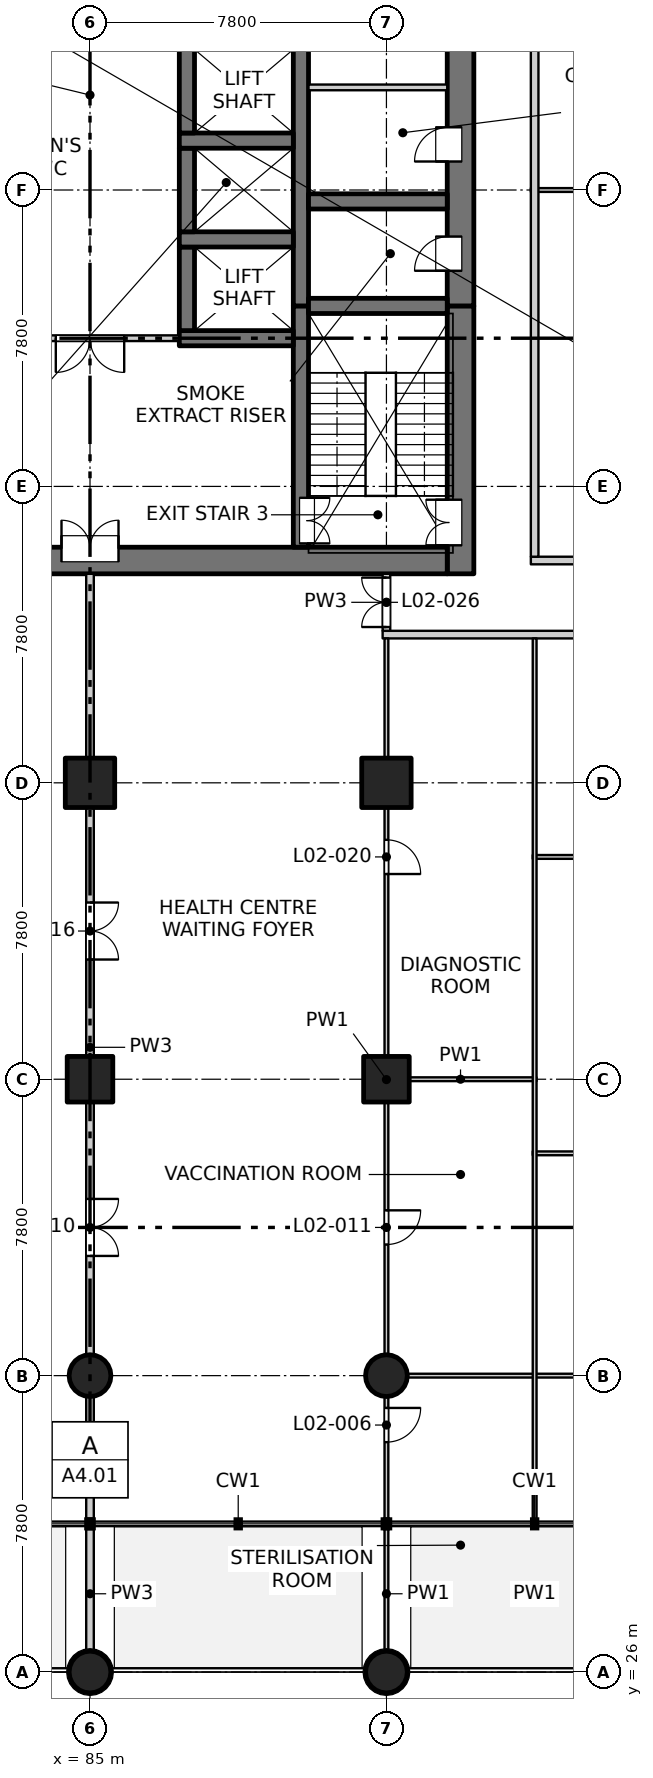
"""IFC4 building model, lengths in metres.
Left out: names, types, materials, properties, quantities, classifications, styles, units other than length and angle.
Written with IfcOpenShell. Run it as: python <this file> out.ifc"""

import sys

from ifc_helpers import new_model, si_unit, direction, frame, frame_2d, origin, origin_2d, place, context, subcontext, project, spatial, rectangle, circle, extrude, element, fill, save


model = new_model("IFC4")
c1 = context("Model", 3, precision=1e-05, world=origin(), true_north=direction((0.0, 1.0)))
c2 = subcontext(c1, "Body", "Model", "MODEL_VIEW")
j1 = project(units=[si_unit("LENGTHUNIT", "METRE"), si_unit("PLANEANGLEUNIT", "RADIAN")], contexts=[c1])
p1 = place(None, origin())
s1 = spatial("IfcSite", under=j1, at=p1, CompositionType="ELEMENT")
p2 = place(p1, origin())
s2 = spatial("IfcBuilding", under=s1, at=p2, CompositionType="ELEMENT")
p3 = place(p2, frame((0.0, 0.0, 10.5)))
s3 = spatial("IfcBuildingStorey", under=s2, at=p3, CompositionType="ELEMENT", Elevation=10.5)
for number, where, z_axis, x_axis in (
    (1, (85.0, 41.6, -0.3), (0.0, 0.0, 1.0), (1.0, 0.0, 0.0)),
    (2, (92.8, 41.6, -0.3), (0.0, 0.0, 1.0), (1.0, 0.0, 0.0)),
):
    element("IfcColumn", number, at=place(p3, frame(where, z_axis=z_axis, x_axis=x_axis)), inside=s3, PredefinedType="COLUMN", context=c2, shape_type="SweptSolid", body=[
        extrude(rectangle(XDim=1.2, YDim=1.2, at=origin_2d()), origin(), (0.0, 0.0, 1.0), 4.45),
    ])
for number, where, z_axis, x_axis in (
    (3, (85.0, 49.4, -0.3), (0.0, 0.0, 1.0), (1.0, 0.0, 0.0)),
    (4, (92.8, 49.4, -0.3), (0.0, 0.0, 1.0), (1.0, 0.0, 0.0)),
):
    element("IfcColumn", number, at=place(p3, frame(where, z_axis=z_axis, x_axis=x_axis)), inside=s3, PredefinedType="COLUMN", context=c2, shape_type="SweptSolid", body=[
        extrude(rectangle(XDim=1.3, YDim=1.3, at=origin_2d()), origin(), (0.0, 0.0, 1.0), 4.45),
    ])
for number, where, z_axis, x_axis in (
    (5, (85.0, 26.0, -0.3), (0.0, 0.0, 1.0), (1.0, 0.0, 0.0)),
    (6, (85.0, 33.8, -0.3), (0.0, 0.0, 1.0), (1.0, 0.0, 0.0)),
    (7, (92.8, 26.0, -0.3), (0.0, 0.0, 1.0), (1.0, 0.0, 0.0)),
    (8, (92.8, 33.8, -0.3), (0.0, 0.0, 1.0), (1.0, 0.0, 0.0)),
):
    element("IfcColumn", number, at=place(p3, frame(where, z_axis=z_axis, x_axis=x_axis)), inside=s3, PredefinedType="COLUMN", context=c2, shape_type="SweptSolid", body=[
        extrude(circle(Radius=0.55, at=origin_2d()), origin(), (0.0, 0.0, 1.0), 4.45),
    ])
p4 = place(p3, frame((94.75, 54.9, -0.3), z_axis=(0.0, 0.0, 1.0), x_axis=(0.0, 1.0, 0.0)))
e9 = element("IfcWall", 9, at=p4, inside=s3, PredefinedType="SOLIDWALL", context=c2, shape_type="SweptSolid", body=[
    extrude(rectangle(XDim=7.05, YDim=0.7, at=frame_2d((3.525, 0.0))), origin(), (0.0, 0.0, 1.0), 4.45),
])
p5 = place(p4, frame((0.75, 0.0, 0.3)))
e10 = element("IfcOpeningElement", 10, at=p5, cuts=e9, PredefinedType="OPENING", context=c2, shape_type="SweptSolid", body=[
    extrude(rectangle(XDim=1.2, YDim=2.1, at=frame_2d((0.6, 1.05))), frame((0.0, 0.36, 0.0), z_axis=(0.0, -1.0, 0.0), x_axis=(1.0, 0.0, 0.0)), (0.0, 0.0, 1.0), 0.72),
])
p6 = place(p3, frame((94.75, 61.95, -0.3), z_axis=(0.0, 0.0, 1.0), x_axis=(0.0, 1.0, 0.0)))
e11 = element("IfcWall", 11, at=p6, inside=s3, PredefinedType="SOLIDWALL", context=c2, shape_type="SweptSolid", body=[
    extrude(rectangle(XDim=15.35, YDim=0.7, at=frame_2d((7.675, 0.0))), origin(), (0.0, 0.0, 1.0), 4.45),
])
p7 = place(p6, frame((0.925, 0.0, 0.3)))
e12 = element("IfcOpeningElement", 12, at=p7, cuts=e11, PredefinedType="OPENING", context=c2, shape_type="SweptSolid", body=[
    extrude(rectangle(XDim=0.9, YDim=2.1, at=frame_2d((0.45, 1.05))), frame((0.0, 0.36, 0.0), z_axis=(0.0, -1.0, 0.0), x_axis=(1.0, 0.0, 0.0)), (0.0, 0.0, 1.0), 0.72),
])
p8 = place(p6, frame((3.8, 0.0, 0.3)))
e13 = element("IfcOpeningElement", 13, at=p8, cuts=e11, PredefinedType="OPENING", context=c2, shape_type="SweptSolid", body=[
    extrude(rectangle(XDim=0.9, YDim=2.1, at=frame_2d((0.45, 1.05))), frame((0.0, 0.36, 0.0), z_axis=(0.0, -1.0, 0.0), x_axis=(1.0, 0.0, 0.0)), (0.0, 0.0, 1.0), 0.72),
])
p9 = place(p6, frame((6.8, 0.0, 0.3)))
e14 = element("IfcOpeningElement", 14, at=p9, cuts=e11, PredefinedType="OPENING", context=c2, shape_type="SweptSolid", body=[
    extrude(rectangle(XDim=0.9, YDim=2.1, at=frame_2d((0.45, 1.05))), frame((0.0, 0.36, 0.0), z_axis=(0.0, -1.0, 0.0), x_axis=(1.0, 0.0, 0.0)), (0.0, 0.0, 1.0), 0.72),
])
p10 = place(p6, frame((9.8, 0.0, 0.3)))
e15 = element("IfcOpeningElement", 15, at=p10, cuts=e11, PredefinedType="OPENING", context=c2, shape_type="SweptSolid", body=[
    extrude(rectangle(XDim=0.9, YDim=2.1, at=frame_2d((0.45, 1.05))), frame((0.0, 0.36, 0.0), z_axis=(0.0, -1.0, 0.0), x_axis=(1.0, 0.0, 0.0)), (0.0, 0.0, 1.0), 0.72),
])
p11 = place(p6, frame((13.1, 0.0, 0.3)))
e16 = element("IfcOpeningElement", 16, at=p11, cuts=e11, PredefinedType="OPENING", context=c2, shape_type="SweptSolid", body=[
    extrude(rectangle(XDim=0.9, YDim=2.1, at=frame_2d((0.45, 1.05))), frame((0.0, 0.36, 0.0), z_axis=(0.0, -1.0, 0.0), x_axis=(1.0, 0.0, 0.0)), (0.0, 0.0, 1.0), 0.72),
])
p12 = place(p3, frame((75.6, 55.25, -0.3), z_axis=(0.0, 0.0, 1.0), x_axis=(1.0, 0.0, 0.0)))
e17 = element("IfcWall", 17, at=p12, inside=s3, PredefinedType="SOLIDWALL", context=c2, shape_type="SweptSolid", body=[
    extrude(rectangle(XDim=18.8, YDim=0.7, at=frame_2d((9.4, 0.0))), origin(), (0.0, 0.0, 1.0), 4.45),
])
p13 = place(p12, frame((8.65, 0.0, 0.3)))
e18 = element("IfcOpeningElement", 18, at=p13, cuts=e17, PredefinedType="OPENING", context=c2, shape_type="SweptSolid", body=[
    extrude(rectangle(XDim=1.5, YDim=2.1, at=frame_2d((0.75, 1.05))), frame((0.0, 0.36, 0.0), z_axis=(0.0, -1.0, 0.0), x_axis=(1.0, 0.0, 0.0)), (0.0, 0.0, 1.0), 0.72),
])
p14 = place(p3, frame((90.55, 55.6, -0.3), z_axis=(0.0, 0.0, 1.0), x_axis=(0.0, 1.0, 0.0)))
e19 = element("IfcWall", 19, at=p14, inside=s3, PredefinedType="SOLIDWALL", context=c2, shape_type="SweptSolid", body=[
    extrude(rectangle(XDim=6.35, YDim=0.4, at=frame_2d((3.175, 0.0))), origin(), (0.0, 0.0, 1.0), 4.45),
])
p15 = place(p14, frame((0.1, 0.0, 0.3)))
e20 = element("IfcOpeningElement", 20, at=p15, cuts=e19, PredefinedType="OPENING", context=c2, shape_type="SweptSolid", body=[
    extrude(rectangle(XDim=1.2, YDim=2.1, at=frame_2d((0.6, 1.05))), frame((0.0, 0.21, 0.0), z_axis=(0.0, -1.0, 0.0), x_axis=(1.0, 0.0, 0.0)), (0.0, 0.0, 1.0), 0.42),
])
p16 = place(p3, frame((90.55, 61.95, -0.3), z_axis=(0.0, 0.0, 1.0), x_axis=(0.0, 1.0, 0.0)))
e21 = element("IfcWall", 21, at=p16, inside=s3, PredefinedType="SOLIDWALL", context=c2, shape_type="SweptSolid", body=[
    extrude(rectangle(XDim=15.35, YDim=0.4, at=frame_2d((7.675, 0.0))), origin(), (0.0, 0.0, 1.0), 4.45),
])
p17 = place(p3, frame((87.35, 61.1, -0.3), z_axis=(0.0, 0.0, 1.0), x_axis=(1.0, 0.0, 0.0)))
e22 = element("IfcWall", 22, at=p17, inside=s3, PredefinedType="SOLIDWALL", context=c2, shape_type="SweptSolid", body=[
    extrude(rectangle(XDim=3.0, YDim=0.4, at=frame_2d((1.5, 0.0))), origin(), (0.0, 0.0, 1.0), 4.45),
])
p18 = place(p3, frame((87.55, 61.3, -0.3), z_axis=(0.0, 0.0, 1.0), x_axis=(0.0, 1.0, 0.0)))
e23 = element("IfcWall", 23, at=p18, inside=s3, PredefinedType="SOLIDWALL", context=c2, shape_type="SweptSolid", body=[
    extrude(rectangle(XDim=2.2, YDim=0.4, at=frame_2d((1.1, 0.0))), origin(), (0.0, 0.0, 1.0), 4.45),
])
p19 = place(p3, frame((87.35, 63.7, -0.3), z_axis=(0.0, 0.0, 1.0), x_axis=(1.0, 0.0, 0.0)))
e24 = element("IfcWall", 24, at=p19, inside=s3, PredefinedType="SOLIDWALL", context=c2, shape_type="SweptSolid", body=[
    extrude(rectangle(XDim=3.0, YDim=0.4, at=frame_2d((1.5, 0.0))), origin(), (0.0, 0.0, 1.0), 4.45),
])
p20 = place(p3, frame((87.55, 63.9, -0.3), z_axis=(0.0, 0.0, 1.0), x_axis=(0.0, 1.0, 0.0)))
e25 = element("IfcWall", 25, at=p20, inside=s3, PredefinedType="SOLIDWALL", context=c2, shape_type="SweptSolid", body=[
    extrude(rectangle(XDim=2.2, YDim=0.4, at=frame_2d((1.1, 0.0))), origin(), (0.0, 0.0, 1.0), 4.45),
])
p21 = place(p3, frame((87.35, 66.3, -0.3), z_axis=(0.0, 0.0, 1.0), x_axis=(1.0, 0.0, 0.0)))
e26 = element("IfcWall", 26, at=p21, inside=s3, PredefinedType="SOLIDWALL", context=c2, shape_type="SweptSolid", body=[
    extrude(rectangle(XDim=3.0, YDim=0.4, at=frame_2d((1.5, 0.0))), origin(), (0.0, 0.0, 1.0), 4.45),
])
p22 = place(p3, frame((87.55, 66.5, -0.3), z_axis=(0.0, 0.0, 1.0), x_axis=(0.0, 1.0, 0.0)))
e27 = element("IfcWall", 27, at=p22, inside=s3, PredefinedType="SOLIDWALL", context=c2, shape_type="SweptSolid", body=[
    extrude(rectangle(XDim=2.2, YDim=0.4, at=frame_2d((1.1, 0.0))), origin(), (0.0, 0.0, 1.0), 4.45),
])
for number, where, z_axis, x_axis in (
    (28, (90.75, 61.95, -0.3), (0.0, 0.0, 1.0), (1.0, 0.0, 0.0)),
    (29, (90.75, 64.7, -0.3), (0.0, 0.0, 1.0), (1.0, 0.0, 0.0)),
):
    element("IfcWall", number, at=place(p3, frame(where, z_axis=z_axis, x_axis=x_axis)), inside=s3, PredefinedType="SOLIDWALL", context=c2, shape_type="SweptSolid", body=[
        extrude(rectangle(XDim=3.65, YDim=0.4, at=frame_2d((1.825, 0.0))), origin(), (0.0, 0.0, 1.0), 4.45),
    ])
p23 = place(p3, frame((92.75, 33.8, 0.0), z_axis=(0.0, 0.0, 1.0), x_axis=(1.0, 0.0, 0.0)))
e30 = element("IfcWall", 30, at=p23, inside=s3, PredefinedType="PARTITIONING", context=c2, shape_type="SweptSolid", body=[
    extrude(rectangle(XDim=17.7, YDim=0.1, at=frame_2d((8.85, 0.0))), origin(), (0.0, 0.0, 1.0), 4.15),
])
p24 = place(p3, frame((96.65, 39.65, 0.0), z_axis=(0.0, 0.0, 1.0), x_axis=(1.0, 0.0, 0.0)))
e31 = element("IfcWall", 31, at=p24, inside=s3, PredefinedType="PARTITIONING", context=c2, shape_type="SweptSolid", body=[
    extrude(rectangle(XDim=13.8, YDim=0.1, at=frame_2d((6.9, 0.0))), origin(), (0.0, 0.0, 1.0), 4.15),
])
p25 = place(p3, frame((92.75, 41.6, 0.0), z_axis=(0.0, 0.0, 1.0), x_axis=(1.0, 0.0, 0.0)))
e32 = element("IfcWall", 32, at=p25, inside=s3, PredefinedType="PARTITIONING", context=c2, shape_type="SweptSolid", body=[
    extrude(rectangle(XDim=4.0, YDim=0.1, at=frame_2d((2.0, 0.0))), origin(), (0.0, 0.0, 1.0), 3.7),
])
p26 = place(p3, frame((96.65, 47.45, 0.0), z_axis=(0.0, 0.0, 1.0), x_axis=(1.0, 0.0, 0.0)))
e33 = element("IfcWall", 33, at=p26, inside=s3, PredefinedType="PARTITIONING", context=c2, shape_type="SweptSolid", body=[
    extrude(rectangle(XDim=13.8, YDim=0.1, at=frame_2d((6.9, 0.0))), origin(), (0.0, 0.0, 1.0), 4.15),
])
p27 = place(p3, frame((92.7, 53.3, 0.0), z_axis=(0.0, 0.0, 1.0), x_axis=(1.0, 0.0, 0.0)))
e34 = element("IfcWall", 34, at=p27, inside=s3, PredefinedType="PARTITIONING", context=c2, shape_type="SweptSolid", body=[
    extrude(rectangle(XDim=17.75, YDim=0.2, at=frame_2d((8.875, 0.0))), origin(), (0.0, 0.0, 1.0), 4.15),
])
p28 = place(p3, frame((96.6, 55.25, 0.0), z_axis=(0.0, 0.0, 1.0), x_axis=(1.0, 0.0, 0.0)))
e35 = element("IfcWall", 35, at=p28, inside=s3, PredefinedType="PARTITIONING", context=c2, shape_type="SweptSolid", body=[
    extrude(rectangle(XDim=13.85, YDim=0.2, at=frame_2d((6.925, 0.0))), origin(), (0.0, 0.0, 1.0), 4.15),
])
p29 = place(p3, frame((82.65, 61.1, 0.0), z_axis=(0.0, 0.0, 1.0), x_axis=(1.0, 0.0, 0.0)))
e36 = element("IfcWall", 36, at=p29, inside=s3, PredefinedType="PARTITIONING", context=c2, shape_type="SweptSolid", body=[
    extrude(rectangle(XDim=4.7, YDim=0.15, at=frame_2d((2.35, 0.0))), origin(), (0.0, 0.0, 1.0), 4.15),
])
p30 = place(p29, frame((1.45, 0.0, 0.0)))
e37 = element("IfcOpeningElement", 37, at=p30, cuts=e36, PredefinedType="OPENING", context=c2, shape_type="SweptSolid", body=[
    extrude(rectangle(XDim=1.8, YDim=2.1, at=frame_2d((0.9, 1.05))), frame((0.0, 0.085, 0.0), z_axis=(0.0, -1.0, 0.0), x_axis=(1.0, 0.0, 0.0)), (0.0, 0.0, 1.0), 0.17),
])
p31 = place(p3, frame((96.6, 65.0, 0.0), z_axis=(0.0, 0.0, 1.0), x_axis=(1.0, 0.0, 0.0)))
e38 = element("IfcWall", 38, at=p31, inside=s3, PredefinedType="PARTITIONING", context=c2, shape_type="SweptSolid", body=[
    extrude(rectangle(XDim=13.85, YDim=0.1, at=frame_2d((6.925, 0.0))), origin(), (0.0, 0.0, 1.0), 4.15),
])
p32 = place(p3, frame((90.75, 67.7, 0.0), z_axis=(0.0, 0.0, 1.0), x_axis=(1.0, 0.0, 0.0)))
e39 = element("IfcWall", 39, at=p32, inside=s3, PredefinedType="PARTITIONING", context=c2, shape_type="SweptSolid", body=[
    extrude(rectangle(XDim=3.65, YDim=0.15, at=frame_2d((1.825, 0.0))), origin(), (0.0, 0.0, 1.0), 4.15),
])
p33 = place(p3, frame((85.0, 26.3, 0.0), z_axis=(0.0, 0.0, 1.0), x_axis=(0.0, 1.0, 0.0)))
e40 = element("IfcWall", 40, at=p33, inside=s3, PredefinedType="PARTITIONING", context=c2, shape_type="SweptSolid", body=[
    extrude(rectangle(XDim=3.52, YDim=0.2, at=frame_2d((1.76, 0.0))), origin(), (0.0, 0.0, 1.0), 4.15),
])
p34 = place(p3, frame((85.0, 29.98, 0.0), z_axis=(0.0, 0.0, 1.0), x_axis=(0.0, 1.0, 0.0)))
e41 = element("IfcWall", 41, at=p34, inside=s3, PredefinedType="PARTITIONING", context=c2, shape_type="SweptSolid", body=[
    extrude(rectangle(XDim=24.92, YDim=0.2, at=frame_2d((12.46, 0.0))), origin(), (0.0, 0.0, 1.0), 4.15),
])
p35 = place(p34, frame((6.97, 0.0, 0.0)))
e42 = element("IfcOpeningElement", 42, at=p35, cuts=e41, PredefinedType="OPENING", context=c2, shape_type="SweptSolid", body=[
    extrude(rectangle(XDim=1.5, YDim=2.1, at=frame_2d((0.75, 1.05))), frame((0.0, 0.11, 0.0), z_axis=(0.0, -1.0, 0.0), x_axis=(1.0, 0.0, 0.0)), (0.0, 0.0, 1.0), 0.22),
])
p36 = place(p34, frame((14.77, 0.0, 0.0)))
e43 = element("IfcOpeningElement", 43, at=p36, cuts=e41, PredefinedType="OPENING", context=c2, shape_type="SweptSolid", body=[
    extrude(rectangle(XDim=1.5, YDim=2.1, at=frame_2d((0.75, 1.05))), frame((0.0, 0.11, 0.0), z_axis=(0.0, -1.0, 0.0), x_axis=(1.0, 0.0, 0.0)), (0.0, 0.0, 1.0), 0.22),
])
p37 = place(p3, frame((92.8, 26.3, 0.0), z_axis=(0.0, 0.0, 1.0), x_axis=(0.0, 1.0, 0.0)))
e44 = element("IfcWall", 44, at=p37, inside=s3, PredefinedType="PARTITIONING", context=c2, shape_type="SweptSolid", body=[
    extrude(rectangle(XDim=3.52, YDim=0.1, at=frame_2d((1.76, 0.0))), origin(), (0.0, 0.0, 1.0), 4.15),
])
p38 = place(p3, frame((92.8, 29.98, 0.0), z_axis=(0.0, 0.0, 1.0), x_axis=(0.0, 1.0, 0.0)))
e45 = element("IfcWall", 45, at=p38, inside=s3, PredefinedType="PARTITIONING", context=c2, shape_type="SweptSolid", body=[
    extrude(rectangle(XDim=23.22, YDim=0.1, at=frame_2d((11.61, 0.0))), origin(), (0.0, 0.0, 1.0), 4.15),
])
p39 = place(p38, frame((2.07, 0.0, 0.0)))
e46 = element("IfcOpeningElement", 46, at=p39, cuts=e45, PredefinedType="OPENING", context=c2, shape_type="SweptSolid", body=[
    extrude(rectangle(XDim=0.9, YDim=2.1, at=frame_2d((0.45, 1.05))), frame((0.0, 0.06, 0.0), z_axis=(0.0, -1.0, 0.0), x_axis=(1.0, 0.0, 0.0)), (0.0, 0.0, 1.0), 0.12),
])
p40 = place(p38, frame((7.27, 0.0, 0.0)))
e47 = element("IfcOpeningElement", 47, at=p40, cuts=e45, PredefinedType="OPENING", context=c2, shape_type="SweptSolid", body=[
    extrude(rectangle(XDim=0.9, YDim=2.1, at=frame_2d((0.45, 1.05))), frame((0.0, 0.06, 0.0), z_axis=(0.0, -1.0, 0.0), x_axis=(1.0, 0.0, 0.0)), (0.0, 0.0, 1.0), 0.12),
])
p41 = place(p38, frame((17.02, 0.0, 0.0)))
e48 = element("IfcOpeningElement", 48, at=p41, cuts=e45, PredefinedType="OPENING", context=c2, shape_type="SweptSolid", body=[
    extrude(rectangle(XDim=0.9, YDim=2.1, at=frame_2d((0.45, 1.05))), frame((0.0, 0.06, 0.0), z_axis=(0.0, -1.0, 0.0), x_axis=(1.0, 0.0, 0.0)), (0.0, 0.0, 1.0), 0.12),
])
p42 = place(p3, frame((92.8, 53.4, 0.0), z_axis=(0.0, 0.0, 1.0), x_axis=(0.0, 1.0, 0.0)))
e49 = element("IfcWall", 49, at=p42, inside=s3, PredefinedType="PARTITIONING", context=c2, shape_type="SweptSolid", body=[
    extrude(rectangle(XDim=1.5, YDim=0.2, at=frame_2d((0.75, 0.0))), origin(), (0.0, 0.0, 1.0), 4.15),
])
p43 = place(p42, frame((0.1, 0.0, 0.0)))
e50 = element("IfcOpeningElement", 50, at=p43, cuts=e49, PredefinedType="OPENING", context=c2, shape_type="SweptSolid", body=[
    extrude(rectangle(XDim=1.3, YDim=2.1, at=frame_2d((0.65, 1.05))), frame((0.0, 0.11, 0.0), z_axis=(0.0, -1.0, 0.0), x_axis=(1.0, 0.0, 0.0)), (0.0, 0.0, 1.0), 0.22),
])
p44 = place(p3, frame((96.7, 26.3, 0.0), z_axis=(0.0, 0.0, 1.0), x_axis=(0.0, 1.0, 0.0)))
e51 = element("IfcWall", 51, at=p44, inside=s3, PredefinedType="PARTITIONING", context=c2, shape_type="SweptSolid", body=[
    extrude(rectangle(XDim=3.52, YDim=0.1, at=frame_2d((1.76, 0.0))), origin(), (0.0, 0.0, 1.0), 4.15),
])
p45 = place(p3, frame((96.7, 29.98, 0.0), z_axis=(0.0, 0.0, 1.0), x_axis=(0.0, 1.0, 0.0)))
e52 = element("IfcWall", 52, at=p45, inside=s3, PredefinedType="PARTITIONING", context=c2, shape_type="SweptSolid", body=[
    extrude(rectangle(XDim=23.22, YDim=0.1, at=frame_2d((11.61, 0.0))), origin(), (0.0, 0.0, 1.0), 4.15),
])
p46 = place(p3, frame((96.7, 55.35, 0.0), z_axis=(0.0, 0.0, 1.0), x_axis=(0.0, 1.0, 0.0)))
e53 = element("IfcWall", 53, at=p46, inside=s3, PredefinedType="PARTITIONING", context=c2, shape_type="SweptSolid", body=[
    extrude(rectangle(XDim=32.75, YDim=0.2, at=frame_2d((16.375, 0.0))), origin(), (0.0, 0.0, 1.0), 4.15),
])
p47 = place(p39, origin())
e54 = element("IfcDoor", 54, at=p47, inside=s3, OperationType="SINGLE_SWING_LEFT", PredefinedType="DOOR", context=c2, shape_type="SweptSolid", body=[
    extrude(rectangle(XDim=0.9, YDim=2.1, at=frame_2d((0.45, 1.05))), frame((0.0, 0.025, 0.0), z_axis=(0.0, -1.0, 0.0), x_axis=(1.0, 0.0, 0.0)), (0.0, 0.0, 1.0), 0.05),
])
fill(e46, e54)
p48 = place(p35, origin())
e55 = element("IfcDoor", 55, at=p48, inside=s3, OperationType="DOUBLE_DOOR_SINGLE_SWING", PredefinedType="DOOR", context=c2, shape_type="SweptSolid", body=[
    extrude(rectangle(XDim=1.5, YDim=2.1, at=frame_2d((0.75, 1.05))), frame((0.0, 0.025, 0.0), z_axis=(0.0, -1.0, 0.0), x_axis=(1.0, 0.0, 0.0)), (0.0, 0.0, 1.0), 0.05),
])
fill(e42, e55)
p49 = place(p40, origin())
e56 = element("IfcDoor", 56, at=p49, inside=s3, OperationType="SINGLE_SWING_LEFT", PredefinedType="DOOR", context=c2, shape_type="SweptSolid", body=[
    extrude(rectangle(XDim=0.9, YDim=2.1, at=frame_2d((0.45, 1.05))), frame((0.0, 0.025, 0.0), z_axis=(0.0, -1.0, 0.0), x_axis=(1.0, 0.0, 0.0)), (0.0, 0.0, 1.0), 0.05),
])
fill(e47, e56)
p50 = place(p36, origin())
e57 = element("IfcDoor", 57, at=p50, inside=s3, OperationType="DOUBLE_DOOR_SINGLE_SWING", PredefinedType="DOOR", context=c2, shape_type="SweptSolid", body=[
    extrude(rectangle(XDim=1.5, YDim=2.1, at=frame_2d((0.75, 1.05))), frame((0.0, 0.025, 0.0), z_axis=(0.0, -1.0, 0.0), x_axis=(1.0, 0.0, 0.0)), (0.0, 0.0, 1.0), 0.05),
])
fill(e43, e57)
p51 = place(p41, origin())
e58 = element("IfcDoor", 58, at=p51, inside=s3, OperationType="SINGLE_SWING_RIGHT", PredefinedType="DOOR", context=c2, shape_type="SweptSolid", body=[
    extrude(rectangle(XDim=0.9, YDim=2.1, at=frame_2d((0.45, 1.05))), frame((0.0, 0.025, 0.0), z_axis=(0.0, -1.0, 0.0), x_axis=(1.0, 0.0, 0.0)), (0.0, 0.0, 1.0), 0.05),
])
fill(e48, e58)
p52 = place(p43, origin())
e59 = element("IfcDoor", 59, at=p52, inside=s3, OperationType="DOUBLE_DOOR_SINGLE_SWING", PredefinedType="DOOR", context=c2, shape_type="SweptSolid", body=[
    extrude(rectangle(XDim=1.3, YDim=2.1, at=frame_2d((0.65, 1.05))), frame((0.0, 0.025, 0.0), z_axis=(0.0, -1.0, 0.0), x_axis=(1.0, 0.0, 0.0)), (0.0, 0.0, 1.0), 0.05),
])
fill(e50, e59)
p53 = place(p13, origin())
e60 = element("IfcDoor", 60, at=p53, inside=s3, OperationType="DOUBLE_DOOR_SINGLE_SWING", PredefinedType="DOOR", context=c2, shape_type="SweptSolid", body=[
    extrude(rectangle(XDim=1.5, YDim=2.1, at=frame_2d((0.75, 1.05))), frame((0.0, 0.335, 0.0), z_axis=(0.0, -1.0, 0.0), x_axis=(1.0, 0.0, 0.0)), (0.0, 0.0, 1.0), 0.05),
])
fill(e18, e60)
p54 = place(p15, origin())
e61 = element("IfcDoor", 61, at=p54, inside=s3, OperationType="DOUBLE_DOOR_SINGLE_SWING", PredefinedType="DOOR", context=c2, shape_type="SweptSolid", body=[
    extrude(rectangle(XDim=1.2, YDim=2.1, at=frame_2d((0.6, 1.05))), frame((0.0, -0.135, 0.0), z_axis=(0.0, -1.0, 0.0), x_axis=(1.0, 0.0, 0.0)), (0.0, 0.0, 1.0), 0.05),
])
fill(e20, e61)
p55 = place(p5, origin())
e62 = element("IfcDoor", 62, at=p55, inside=s3, OperationType="DOUBLE_DOOR_SINGLE_SWING", PredefinedType="DOOR", context=c2, shape_type="SweptSolid", body=[
    extrude(rectangle(XDim=1.2, YDim=2.1, at=frame_2d((0.6, 1.05))), frame((0.0, 0.335, 0.0), z_axis=(0.0, -1.0, 0.0), x_axis=(1.0, 0.0, 0.0)), (0.0, 0.0, 1.0), 0.05),
])
fill(e10, e62)
p56 = place(p30, origin())
e63 = element("IfcDoor", 63, at=p56, inside=s3, OperationType="DOUBLE_DOOR_SINGLE_SWING", PredefinedType="DOOR", context=c2, shape_type="SweptSolid", body=[
    extrude(rectangle(XDim=1.8, YDim=2.1, at=frame_2d((0.9, 1.05))), frame((0.0, 0.025, 0.0), z_axis=(0.0, -1.0, 0.0), x_axis=(1.0, 0.0, 0.0)), (0.0, 0.0, 1.0), 0.05),
])
fill(e37, e63)
p57 = place(p7, origin())
e64 = element("IfcDoor", 64, at=p57, inside=s3, OperationType="SINGLE_SWING_LEFT", PredefinedType="DOOR", context=c2, shape_type="SweptSolid", body=[
    extrude(rectangle(XDim=0.9, YDim=2.1, at=frame_2d((0.45, 1.05))), frame((0.0, 0.335, 0.0), z_axis=(0.0, -1.0, 0.0), x_axis=(1.0, 0.0, 0.0)), (0.0, 0.0, 1.0), 0.05),
])
fill(e12, e64)
p58 = place(p8, origin())
e65 = element("IfcDoor", 65, at=p58, inside=s3, OperationType="SINGLE_SWING_LEFT", PredefinedType="DOOR", context=c2, shape_type="SweptSolid", body=[
    extrude(rectangle(XDim=0.9, YDim=2.1, at=frame_2d((0.45, 1.05))), frame((0.0, 0.335, 0.0), z_axis=(0.0, -1.0, 0.0), x_axis=(1.0, 0.0, 0.0)), (0.0, 0.0, 1.0), 0.05),
])
fill(e13, e65)
save(model, sys.argv[1])
